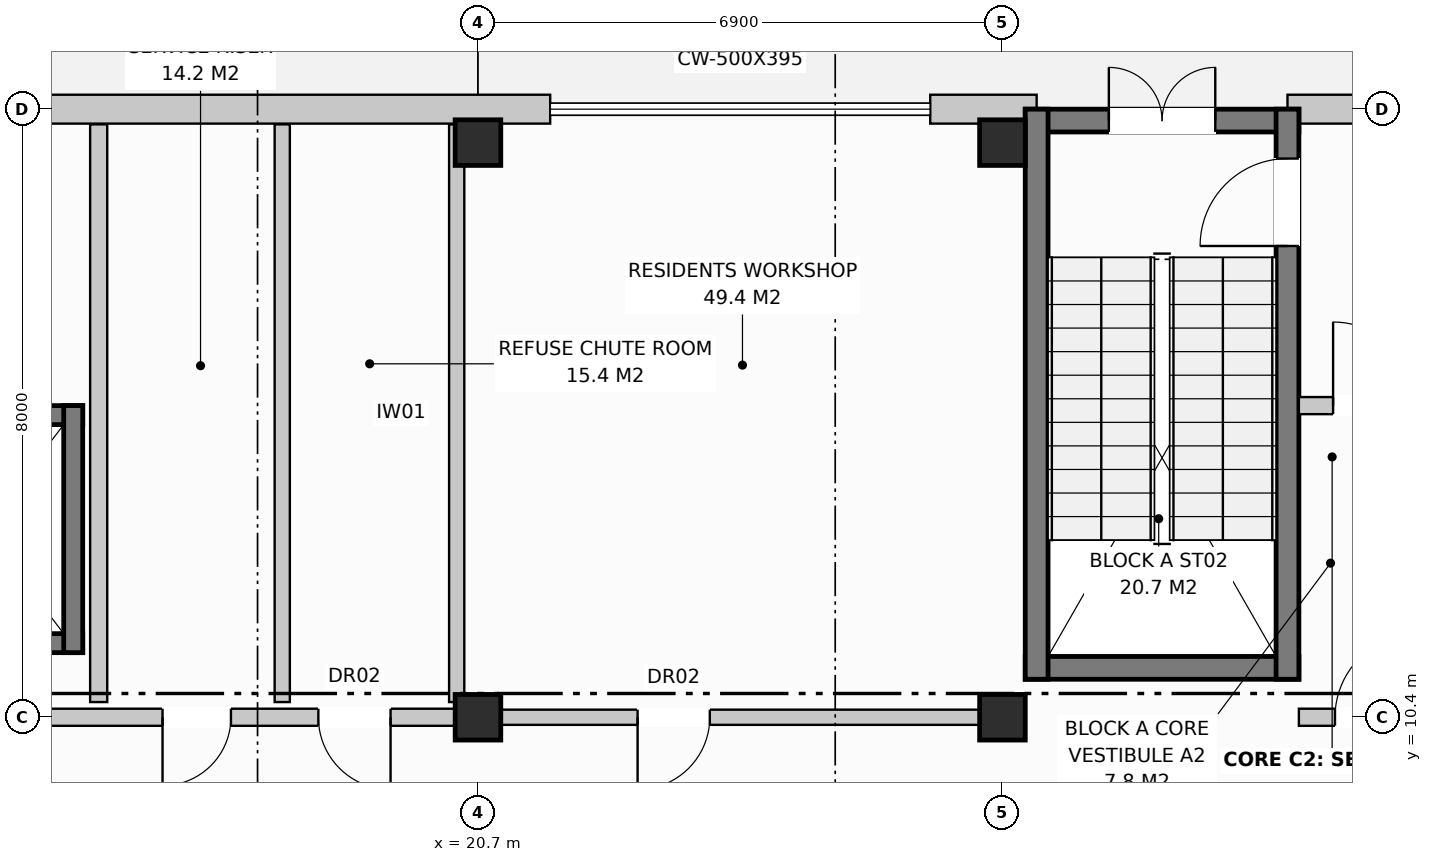
"""IFC4 building model, lengths in metres.
Left out: names, types, materials, properties, quantities, classifications, styles, units other than length and angle.
Written with IfcOpenShell. Run it as: python <this file> out.ifc"""

import sys

from ifc_helpers import new_model, si_unit, direction, frame, frame_2d, origin, origin_with_axes, origin_2d, place, context, subcontext, project, spatial, rectangle, extrude, element, fill, save


model = new_model("IFC4")
c1 = context("Model", 3, precision=1e-05, world=origin(), true_north=direction((0.0, 1.0)))
c2 = subcontext(c1, "Body", "Model", "MODEL_VIEW")
j1 = project(units=[si_unit("LENGTHUNIT", "METRE"), si_unit("PLANEANGLEUNIT", "RADIAN")], contexts=[c1])
p1 = place(None, origin())
s1 = spatial("IfcSite", under=j1, at=p1, CompositionType="ELEMENT")
p2 = place(p1, origin())
s2 = spatial("IfcBuilding", under=s1, at=p2, CompositionType="ELEMENT")
p3 = place(p2, origin())
s3 = spatial("IfcBuildingStorey", under=s2, at=p3, CompositionType="ELEMENT", Elevation=0.0)
for number, where, z_axis, x_axis in (
    (1, (20.7, 10.4, 0.0), (0.0, 0.0, 1.0), (1.0, 0.0, 0.0)),
    (2, (20.7, 17.96, 0.0), (0.0, 0.0, 1.0), (1.0, 0.0, 0.0)),
    (3, (27.6, 10.4, 0.0), (0.0, 0.0, 1.0), (1.0, 0.0, 0.0)),
    (4, (27.6, 17.96, 0.0), (0.0, 0.0, 1.0), (1.0, 0.0, 0.0)),
):
    element("IfcColumn", number, at=place(p3, frame(where, z_axis=z_axis, x_axis=x_axis)), inside=s3, PredefinedType="COLUMN", context=c2, shape_type="SweptSolid", body=[
        extrude(rectangle(XDim=0.6, YDim=0.6, at=origin_2d()), origin(), (0.0, 0.0, 1.0), 4.4),
    ])
p4 = place(p3, frame((10.65, 18.4, 0.0), z_axis=(0.0, 0.0, 1.0), x_axis=(1.0, 0.0, 0.0)))
e5 = element("IfcWall", 5, at=p4, inside=s3, PredefinedType="STANDARD", context=c2, shape_type="SweptSolid", body=[
    extrude(rectangle(XDim=11.0, YDim=0.38, at=frame_2d((5.5, 0.0))), origin(), (0.0, 0.0, 1.0), 4.12),
])
p5 = place(p3, frame((26.65, 18.4, 0.0), z_axis=(0.0, 0.0, 1.0), x_axis=(1.0, 0.0, 0.0)))
e6 = element("IfcWall", 6, at=p5, inside=s3, PredefinedType="STANDARD", context=c2, shape_type="SweptSolid", body=[
    extrude(rectangle(XDim=1.4, YDim=0.38, at=frame_2d((0.7, 0.0))), origin(), (0.0, 0.0, 1.0), 4.12),
])
p6 = place(p3, frame((31.35, 18.4, 0.0), z_axis=(0.0, 0.0, 1.0), x_axis=(1.0, 0.0, 0.0)))
e7 = element("IfcWall", 7, at=p6, inside=s3, PredefinedType="STANDARD", context=c2, shape_type="SweptSolid", body=[
    extrude(rectangle(XDim=11.0, YDim=0.38, at=frame_2d((5.5, 0.0))), origin(), (0.0, 0.0, 1.0), 4.12),
])
p7 = place(p3, frame((12.9, 14.375, 0.0), z_axis=(0.0, 0.0, 1.0), x_axis=(1.0, 0.0, 0.0)))
e8 = element("IfcWall", 8, at=p7, inside=s3, PredefinedType="SHEAR", context=c2, shape_type="SweptSolid", body=[
    extrude(rectangle(XDim=2.6, YDim=0.25, at=frame_2d((1.3, 0.0))), origin(), (0.0, 0.0, 1.0), 4.12),
])
p8 = place(p7, frame((0.875, 0.0, 0.0)))
e9 = element("IfcOpeningElement", 9, at=p8, cuts=e8, PredefinedType="OPENING", context=c2, shape_type="SweptSolid", body=[
    extrude(rectangle(XDim=1.1, YDim=2.1, at=frame_2d((0.55, 1.05))), frame((0.0, 0.137, 0.0), z_axis=(0.0, -1.0, 0.0), x_axis=(1.0, 0.0, 0.0)), (0.0, 0.0, 1.0), 0.274),
])
p9 = place(p3, frame((12.9, 11.375, 0.0), z_axis=(0.0, 0.0, 1.0), x_axis=(1.0, 0.0, 0.0)))
e10 = element("IfcWall", 10, at=p9, inside=s3, PredefinedType="SHEAR", context=c2, shape_type="SweptSolid", body=[
    extrude(rectangle(XDim=2.6, YDim=0.25, at=frame_2d((1.3, 0.0))), origin(), (0.0, 0.0, 1.0), 4.12),
])
p10 = place(p3, frame((15.375, 11.25, 0.0), z_axis=(0.0, 0.0, 1.0), x_axis=(0.0, 1.0, 0.0)))
e11 = element("IfcWall", 11, at=p10, inside=s3, PredefinedType="SHEAR", context=c2, shape_type="SweptSolid", body=[
    extrude(rectangle(XDim=3.25, YDim=0.25, at=frame_2d((1.625, 0.0))), origin(), (0.0, 0.0, 1.0), 4.12),
])
p11 = place(p3, frame((15.71, 10.6, 0.0), z_axis=(0.0, 0.0, 1.0), x_axis=(0.0, 1.0, 0.0)))
e12 = element("IfcWall", 12, at=p11, inside=s3, PredefinedType="PARTITIONING", context=c2, shape_type="SweptSolid", body=[
    extrude(rectangle(XDim=7.6, YDim=0.225, at=frame_2d((3.8, 0.0))), origin(), (0.0, 0.0, 1.0), 3.79),
])
p12 = place(p3, frame((18.125, 10.6, 0.0), z_axis=(0.0, 0.0, 1.0), x_axis=(0.0, 1.0, 0.0)))
e13 = element("IfcWall", 13, at=p12, inside=s3, PredefinedType="PARTITIONING", context=c2, shape_type="SweptSolid", body=[
    extrude(rectangle(XDim=7.6, YDim=0.2, at=frame_2d((3.8, 0.0))), origin(), (0.0, 0.0, 1.0), 3.79),
])
p13 = place(p3, frame((20.42, 10.6, 0.0), z_axis=(0.0, 0.0, 1.0), x_axis=(0.0, 1.0, 0.0)))
e14 = element("IfcWall", 14, at=p13, inside=s3, PredefinedType="PARTITIONING", context=c2, shape_type="SweptSolid", body=[
    extrude(rectangle(XDim=7.6, YDim=0.2, at=frame_2d((3.8, 0.0))), origin(), (0.0, 0.0, 1.0), 4.12),
])
p14 = place(p3, frame((10.8, 10.4, 0.0), z_axis=(0.0, 0.0, 1.0), x_axis=(1.0, 0.0, 0.0)))
e15 = element("IfcWall", 15, at=p14, inside=s3, PredefinedType="PARTITIONING", context=c2, shape_type="SweptSolid", body=[
    extrude(rectangle(XDim=9.9, YDim=0.225, at=frame_2d((4.95, 0.0))), origin(), (0.0, 0.0, 1.0), 3.56),
])
p15 = place(p14, frame((0.475, 0.0, 0.0)))
e16 = element("IfcOpeningElement", 16, at=p15, cuts=e15, PredefinedType="OPENING", context=c2, shape_type="SweptSolid", body=[
    extrude(rectangle(XDim=1.1, YDim=2.15, at=frame_2d((0.55, 1.075))), frame((0.0, 0.125, 0.0), z_axis=(0.0, -1.0, 0.0), x_axis=(1.0, 0.0, 0.0)), (0.0, 0.0, 1.0), 0.249),
])
p16 = place(p14, frame((5.75, 0.0, 0.0)))
e17 = element("IfcOpeningElement", 17, at=p16, cuts=e15, PredefinedType="OPENING", context=c2, shape_type="SweptSolid", body=[
    extrude(rectangle(XDim=0.9, YDim=2.1, at=frame_2d((0.45, 1.05))), frame((0.0, 0.125, 0.0), z_axis=(0.0, -1.0, 0.0), x_axis=(1.0, 0.0, 0.0)), (0.0, 0.0, 1.0), 0.249),
])
p17 = place(p14, frame((7.8, 0.0, 0.0)))
e18 = element("IfcOpeningElement", 18, at=p17, cuts=e15, PredefinedType="OPENING", context=c2, shape_type="SweptSolid", body=[
    extrude(rectangle(XDim=0.95, YDim=2.15, at=frame_2d((0.475, 1.075))), frame((0.0, 0.125, 0.0), z_axis=(0.0, -1.0, 0.0), x_axis=(1.0, 0.0, 0.0)), (0.0, 0.0, 1.0), 0.249),
])
p18 = place(p3, frame((27.9, 18.25, 0.0), z_axis=(0.0, 0.0, 1.0), x_axis=(1.0, 0.0, 0.0)))
e19 = element("IfcWall", 19, at=p18, inside=s3, PredefinedType="SHEAR", context=c2, shape_type="SweptSolid", body=[
    extrude(rectangle(XDim=3.6, YDim=0.3, at=frame_2d((1.8, 0.0))), origin(), (0.0, 0.0, 1.0), 4.12),
])
p19 = place(p18, frame((1.1, 0.0, 0.0)))
e20 = element("IfcOpeningElement", 20, at=p19, cuts=e19, PredefinedType="OPENING", context=c2, shape_type="SweptSolid", body=[
    extrude(rectangle(XDim=1.4, YDim=2.25, at=frame_2d((0.7, 1.125))), frame((0.0, 0.162, 0.0), z_axis=(0.0, -1.0, 0.0), x_axis=(1.0, 0.0, 0.0)), (0.0, 0.0, 1.0), 0.324),
])
p20 = place(p3, frame((27.9, 11.05, 0.0), z_axis=(0.0, 0.0, 1.0), x_axis=(1.0, 0.0, 0.0)))
e21 = element("IfcWall", 21, at=p20, inside=s3, PredefinedType="SHEAR", context=c2, shape_type="SweptSolid", body=[
    extrude(rectangle(XDim=3.6, YDim=0.3, at=frame_2d((1.8, 0.0))), origin(), (0.0, 0.0, 1.0), 4.12),
])
p21 = place(p3, frame((28.05, 10.9, 0.0), z_axis=(0.0, 0.0, 1.0), x_axis=(0.0, 1.0, 0.0)))
e22 = element("IfcWall", 22, at=p21, inside=s3, PredefinedType="SHEAR", context=c2, shape_type="SweptSolid", body=[
    extrude(rectangle(XDim=7.5, YDim=0.3, at=frame_2d((3.75, 0.0))), origin(), (0.0, 0.0, 1.0), 4.12),
])
p22 = place(p3, frame((31.35, 10.9, 0.0), z_axis=(0.0, 0.0, 1.0), x_axis=(0.0, 1.0, 0.0)))
e23 = element("IfcWall", 23, at=p22, inside=s3, PredefinedType="SHEAR", context=c2, shape_type="SweptSolid", body=[
    extrude(rectangle(XDim=7.5, YDim=0.3, at=frame_2d((3.75, 0.0))), origin(), (0.0, 0.0, 1.0), 4.12),
])
p23 = place(p22, frame((5.7, 0.0, 0.0)))
e24 = element("IfcOpeningElement", 24, at=p23, cuts=e23, PredefinedType="OPENING", context=c2, shape_type="SweptSolid", body=[
    extrude(rectangle(XDim=1.15, YDim=2.15, at=frame_2d((0.575, 1.075))), frame((0.0, 0.162, 0.0), z_axis=(0.0, -1.0, 0.0), x_axis=(1.0, 0.0, 0.0)), (0.0, 0.0, 1.0), 0.324),
])
p24 = place(p3, frame((31.5, 14.5, 0.0), z_axis=(0.0, 0.0, 1.0), x_axis=(1.0, 0.0, 0.0)))
e25 = element("IfcWall", 25, at=p24, inside=s3, PredefinedType="PARTITIONING", context=c2, shape_type="SweptSolid", body=[
    extrude(rectangle(XDim=2.2, YDim=0.225, at=frame_2d((1.1, 0.0))), origin(), (0.0, 0.0, 1.0), 4.12),
])
p25 = place(p24, frame((0.45, 0.0, 0.0)))
e26 = element("IfcOpeningElement", 26, at=p25, cuts=e25, PredefinedType="OPENING", context=c2, shape_type="SweptSolid", body=[
    extrude(rectangle(XDim=1.1, YDim=2.15, at=frame_2d((0.55, 1.075))), frame((0.0, 0.125, 0.0), z_axis=(0.0, -1.0, 0.0), x_axis=(1.0, 0.0, 0.0)), (0.0, 0.0, 1.0), 0.249),
])
p26 = place(p3, frame((27.6, 10.4, 0.0), z_axis=(0.0, 0.0, 1.0), x_axis=(1.0, 0.0, 0.0)))
e27 = element("IfcWall", 27, at=p26, inside=s3, PredefinedType="PARTITIONING", context=c2, shape_type="SweptSolid", body=[
    extrude(rectangle(XDim=0.3, YDim=0.225, at=frame_2d((0.15, 0.0))), origin(), (0.0, 0.0, 1.0), 4.12),
])
p27 = place(p3, frame((31.5, 10.4, 0.0), z_axis=(0.0, 0.0, 1.0), x_axis=(1.0, 0.0, 0.0)))
e28 = element("IfcWall", 28, at=p27, inside=s3, PredefinedType="PARTITIONING", context=c2, shape_type="SweptSolid", body=[
    extrude(rectangle(XDim=9.9, YDim=0.225, at=frame_2d((4.95, 0.0))), origin(), (0.0, 0.0, 1.0), 3.56),
])
p28 = place(p27, frame((0.475, 0.0, 0.0)))
e29 = element("IfcOpeningElement", 29, at=p28, cuts=e28, PredefinedType="OPENING", context=c2, shape_type="SweptSolid", body=[
    extrude(rectangle(XDim=1.1, YDim=2.15, at=frame_2d((0.55, 1.075))), frame((0.0, 0.125, 0.0), z_axis=(0.0, -1.0, 0.0), x_axis=(1.0, 0.0, 0.0)), (0.0, 0.0, 1.0), 0.249),
])
p29 = place(p27, frame((5.75, 0.0, 0.0)))
e30 = element("IfcOpeningElement", 30, at=p29, cuts=e28, PredefinedType="OPENING", context=c2, shape_type="SweptSolid", body=[
    extrude(rectangle(XDim=0.9, YDim=2.1, at=frame_2d((0.45, 1.05))), frame((0.0, 0.125, 0.0), z_axis=(0.0, -1.0, 0.0), x_axis=(1.0, 0.0, 0.0)), (0.0, 0.0, 1.0), 0.249),
])
p30 = place(p27, frame((7.8, 0.0, 0.0)))
e31 = element("IfcOpeningElement", 31, at=p30, cuts=e28, PredefinedType="OPENING", context=c2, shape_type="SweptSolid", body=[
    extrude(rectangle(XDim=0.95, YDim=2.15, at=frame_2d((0.475, 1.075))), frame((0.0, 0.125, 0.0), z_axis=(0.0, -1.0, 0.0), x_axis=(1.0, 0.0, 0.0)), (0.0, 0.0, 1.0), 0.249),
])
p31 = place(p3, frame((20.9, 10.4, 0.0), z_axis=(0.0, 0.0, 1.0), x_axis=(1.0, 0.0, 0.0)))
e32 = element("IfcWall", 32, at=p31, inside=s3, PredefinedType="PARTITIONING", context=c2, shape_type="SweptSolid", body=[
    extrude(rectangle(XDim=6.5, YDim=0.2, at=frame_2d((3.25, 0.0))), origin(), (0.0, 0.0, 1.0), 3.56),
])
p32 = place(p31, frame((1.9, 0.0, 0.0)))
e33 = element("IfcOpeningElement", 33, at=p32, cuts=e32, PredefinedType="OPENING", context=c2, shape_type="SweptSolid", body=[
    extrude(rectangle(XDim=0.95, YDim=2.15, at=frame_2d((0.475, 1.075))), frame((0.0, 0.112, 0.0), z_axis=(0.0, -1.0, 0.0), x_axis=(1.0, 0.0, 0.0)), (0.0, 0.0, 1.0), 0.224),
])
p33 = place(p16, frame((0.9, 0.0, 0.0), z_axis=(0.0, 0.0, 1.0), x_axis=(-1.0, 0.0, 0.0)))
e34 = element("IfcDoor", 34, at=p33, inside=s3, OperationType="SINGLE_SWING_LEFT", PredefinedType="DOOR", context=c2, shape_type="SweptSolid", body=[
    extrude(rectangle(XDim=0.9, YDim=2.1, at=frame_2d((0.45, 1.05))), frame((0.0, 0.025, 0.0), z_axis=(0.0, -1.0, 0.0), x_axis=(1.0, 0.0, 0.0)), (0.0, 0.0, 1.0), 0.05),
])
fill(e17, e34)
p34 = place(p17, frame((0.95, 0.0, 0.0), z_axis=(0.0, 0.0, 1.0), x_axis=(-1.0, 0.0, 0.0)))
e35 = element("IfcDoor", 35, at=p34, inside=s3, OperationType="SINGLE_SWING_RIGHT", PredefinedType="DOOR", context=c2, shape_type="SweptSolid", body=[
    extrude(rectangle(XDim=0.95, YDim=2.15, at=frame_2d((0.475, 1.075))), frame((0.0, 0.025, 0.0), z_axis=(0.0, -1.0, 0.0), x_axis=(1.0, 0.0, 0.0)), (0.0, 0.0, 1.0), 0.05),
])
fill(e18, e35)
p35 = place(p19, origin_with_axes())
e36 = element("IfcDoor", 36, at=p35, inside=s3, OperationType="DOUBLE_DOOR_SINGLE_SWING", PredefinedType="DOOR", context=c2, shape_type="SweptSolid", body=[
    extrude(rectangle(XDim=1.4, YDim=2.25, at=frame_2d((0.7, 1.125))), frame((0.0, 0.025, 0.0), z_axis=(0.0, -1.0, 0.0), x_axis=(1.0, 0.0, 0.0)), (0.0, 0.0, 1.0), 0.05),
])
fill(e20, e36)
p36 = place(p23, origin_with_axes())
e37 = element("IfcDoor", 37, at=p36, inside=s3, OperationType="SINGLE_SWING_LEFT", PredefinedType="DOOR", context=c2, shape_type="SweptSolid", body=[
    extrude(rectangle(XDim=1.15, YDim=2.15, at=frame_2d((0.575, 1.075))), frame((0.0, 0.025, 0.0), z_axis=(0.0, -1.0, 0.0), x_axis=(1.0, 0.0, 0.0)), (0.0, 0.0, 1.0), 0.05),
])
fill(e24, e37)
p37 = place(p25, origin_with_axes())
e38 = element("IfcDoor", 38, at=p37, inside=s3, OperationType="SINGLE_SWING_LEFT", PredefinedType="DOOR", context=c2, shape_type="SweptSolid", body=[
    extrude(rectangle(XDim=1.1, YDim=2.15, at=frame_2d((0.55, 1.075))), frame((0.0, 0.025, 0.0), z_axis=(0.0, -1.0, 0.0), x_axis=(1.0, 0.0, 0.0)), (0.0, 0.0, 1.0), 0.05),
])
fill(e26, e38)
p38 = place(p28, origin_with_axes())
e39 = element("IfcDoor", 39, at=p38, inside=s3, OperationType="SINGLE_SWING_RIGHT", PredefinedType="DOOR", context=c2, shape_type="SweptSolid", body=[
    extrude(rectangle(XDim=1.1, YDim=2.15, at=frame_2d((0.55, 1.075))), frame((0.0, 0.025, 0.0), z_axis=(0.0, -1.0, 0.0), x_axis=(1.0, 0.0, 0.0)), (0.0, 0.0, 1.0), 0.05),
])
fill(e29, e39)
p39 = place(p32, frame((0.95, 0.0, 0.0), z_axis=(0.0, 0.0, 1.0), x_axis=(-1.0, 0.0, 0.0)))
e40 = element("IfcDoor", 40, at=p39, inside=s3, OperationType="SINGLE_SWING_LEFT", PredefinedType="DOOR", context=c2, shape_type="SweptSolid", body=[
    extrude(rectangle(XDim=0.95, YDim=2.15, at=frame_2d((0.475, 1.075))), frame((0.0, 0.025, 0.0), z_axis=(0.0, -1.0, 0.0), x_axis=(1.0, 0.0, 0.0)), (0.0, 0.0, 1.0), 0.05),
])
fill(e33, e40)
save(model, sys.argv[1])
